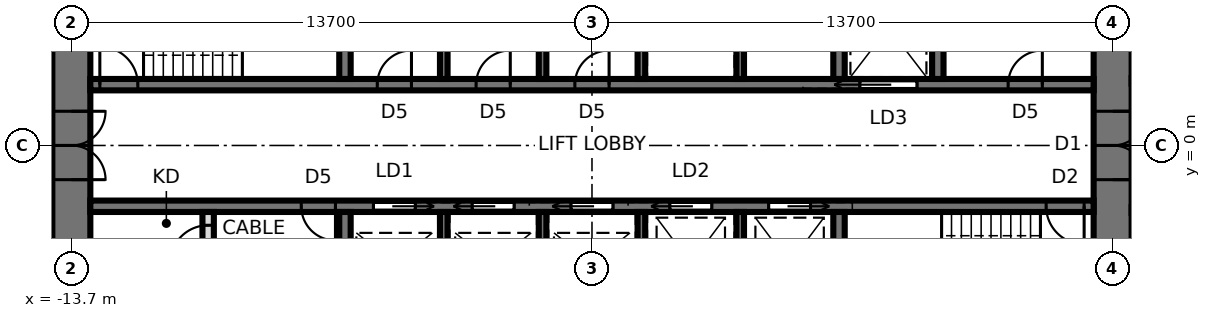
"""IFC4 building model, lengths in metres.
Left out: names, types, materials, properties, quantities, classifications, styles, units other than length and angle.
Written with IfcOpenShell. Run it as: python <this file> out.ifc"""

import sys

from ifc_helpers import new_model, si_unit, direction, frame, frame_2d, origin, place, context, subcontext, project, spatial, rectangle, extrude, element, fill, save


model = new_model("IFC4")
c1 = context("Model", 3, precision=1e-05, world=origin(), true_north=direction((0.0, 1.0)))
c2 = subcontext(c1, "Body", "Model", "MODEL_VIEW")
j1 = project(units=[si_unit("LENGTHUNIT", "METRE"), si_unit("PLANEANGLEUNIT", "RADIAN")], contexts=[c1])
p1 = place(None, origin())
s1 = spatial("IfcSite", under=j1, at=p1, CompositionType="ELEMENT")
p2 = place(p1, origin())
s2 = spatial("IfcBuilding", under=s1, at=p2, CompositionType="ELEMENT")
p3 = place(p2, frame((0.0, 0.0, 154.8)))
s3 = spatial("IfcBuildingStorey", under=s2, at=p3, CompositionType="ELEMENT", Elevation=154.8)
p4 = place(p3, frame((13.7, -9.5, 0.0), z_axis=(0.0, 0.0, 1.0), x_axis=(0.0, 1.0, 0.0)))
e1 = element("IfcWall", 1, at=p4, inside=s3, PredefinedType="SHEAR", context=c2, shape_type="SweptSolid", body=[
    extrude(rectangle(XDim=19.0, YDim=1.0, at=frame_2d((9.5, 0.0))), origin(), (0.0, 0.0, 1.0), 3.9),
])
p5 = place(p4, frame((8.6, 0.0, 0.0)))
e2 = element("IfcOpeningElement", 2, at=p5, cuts=e1, PredefinedType="OPENING", context=c2, shape_type="SweptSolid", body=[
    extrude(rectangle(XDim=1.8, YDim=2.4, at=frame_2d((0.9, 1.2))), frame((0.0, 0.51, 0.0), z_axis=(0.0, -1.0, 0.0), x_axis=(1.0, 0.0, 0.0)), (0.0, 0.0, 1.0), 1.02),
])
p6 = place(p3, frame((-13.7, 9.5, 0.0), z_axis=(0.0, 0.0, 1.0), x_axis=(0.0, -1.0, 0.0)))
e3 = element("IfcWall", 3, at=p6, inside=s3, PredefinedType="SHEAR", context=c2, shape_type="SweptSolid", body=[
    extrude(rectangle(XDim=19.0, YDim=1.0, at=frame_2d((9.5, 0.0))), origin(), (0.0, 0.0, 1.0), 3.9),
])
p7 = place(p6, frame((8.6, 0.0, 0.0)))
e4 = element("IfcOpeningElement", 4, at=p7, cuts=e3, PredefinedType="OPENING", context=c2, shape_type="SweptSolid", body=[
    extrude(rectangle(XDim=1.8, YDim=2.4, at=frame_2d((0.9, 1.2))), frame((0.0, 0.51, 0.0), z_axis=(0.0, -1.0, 0.0), x_axis=(1.0, 0.0, 0.0)), (0.0, 0.0, 1.0), 1.02),
])
p8 = place(p3, frame((-13.2, 1.6, 0.0), z_axis=(0.0, 0.0, 1.0), x_axis=(1.0, 0.0, 0.0)))
e5 = element("IfcWall", 5, at=p8, inside=s3, PredefinedType="SHEAR", context=c2, shape_type="SweptSolid", body=[
    extrude(rectangle(XDim=26.4, YDim=0.3, at=frame_2d((13.2, 0.0))), origin(), (0.0, 0.0, 1.0), 3.9),
])
p9 = place(p8, frame((0.25, 0.0, 0.0)))
e6 = element("IfcOpeningElement", 6, at=p9, cuts=e5, PredefinedType="OPENING", context=c2, shape_type="SweptSolid", body=[
    extrude(rectangle(XDim=1.0, YDim=2.1, at=frame_2d((0.5, 1.05))), frame((0.0, 0.16, 0.0), z_axis=(0.0, -1.0, 0.0), x_axis=(1.0, 0.0, 0.0)), (0.0, 0.0, 1.0), 0.32),
])
p10 = place(p8, frame((20.25, 0.0, 0.0)))
e7 = element("IfcOpeningElement", 7, at=p10, cuts=e5, PredefinedType="OPENING", context=c2, shape_type="SweptSolid", body=[
    extrude(rectangle(XDim=1.5, YDim=2.4, at=frame_2d((0.75, 1.2))), frame((0.0, 0.16, 0.0), z_axis=(0.0, -1.0, 0.0), x_axis=(1.0, 0.0, 0.0)), (0.0, 0.0, 1.0), 0.32),
])
p11 = place(p8, frame((7.55, 0.0, 0.0)))
e8 = element("IfcOpeningElement", 8, at=p11, cuts=e5, PredefinedType="OPENING", context=c2, shape_type="SweptSolid", body=[
    extrude(rectangle(XDim=0.9, YDim=2.1, at=frame_2d((0.45, 1.05))), frame((0.0, 0.16, 0.0), z_axis=(0.0, -1.0, 0.0), x_axis=(1.0, 0.0, 0.0)), (0.0, 0.0, 1.0), 0.32),
])
p12 = place(p8, frame((10.15, 0.0, 0.0)))
e9 = element("IfcOpeningElement", 9, at=p12, cuts=e5, PredefinedType="OPENING", context=c2, shape_type="SweptSolid", body=[
    extrude(rectangle(XDim=0.9, YDim=2.1, at=frame_2d((0.45, 1.05))), frame((0.0, 0.16, 0.0), z_axis=(0.0, -1.0, 0.0), x_axis=(1.0, 0.0, 0.0)), (0.0, 0.0, 1.0), 0.32),
])
p13 = place(p8, frame((12.75, 0.0, 0.0)))
e10 = element("IfcOpeningElement", 10, at=p13, cuts=e5, PredefinedType="OPENING", context=c2, shape_type="SweptSolid", body=[
    extrude(rectangle(XDim=0.9, YDim=2.1, at=frame_2d((0.45, 1.05))), frame((0.0, 0.16, 0.0), z_axis=(0.0, -1.0, 0.0), x_axis=(1.0, 0.0, 0.0)), (0.0, 0.0, 1.0), 0.32),
])
p14 = place(p8, frame((24.15, 0.0, 0.0)))
e11 = element("IfcOpeningElement", 11, at=p14, cuts=e5, PredefinedType="OPENING", context=c2, shape_type="SweptSolid", body=[
    extrude(rectangle(XDim=0.9, YDim=2.1, at=frame_2d((0.45, 1.05))), frame((0.0, 0.16, 0.0), z_axis=(0.0, -1.0, 0.0), x_axis=(1.0, 0.0, 0.0)), (0.0, 0.0, 1.0), 0.32),
])
p15 = place(p3, frame((-13.2, -1.6, 0.0), z_axis=(0.0, 0.0, 1.0), x_axis=(1.0, 0.0, 0.0)))
e12 = element("IfcWall", 12, at=p15, inside=s3, PredefinedType="SHEAR", context=c2, shape_type="SweptSolid", body=[
    extrude(rectangle(XDim=26.4, YDim=0.3, at=frame_2d((13.2, 0.0))), origin(), (0.0, 0.0, 1.0), 3.9),
])
p16 = place(p15, frame((25.15, 0.0, 0.0)))
e13 = element("IfcOpeningElement", 13, at=p16, cuts=e12, PredefinedType="OPENING", context=c2, shape_type="SweptSolid", body=[
    extrude(rectangle(XDim=1.0, YDim=2.1, at=frame_2d((0.5, 1.05))), frame((0.0, 0.16, 0.0), z_axis=(0.0, -1.0, 0.0), x_axis=(1.0, 0.0, 0.0)), (0.0, 0.0, 1.0), 0.32),
])
p17 = place(p15, frame((7.45, 0.0, 0.0)))
e14 = element("IfcOpeningElement", 14, at=p17, cuts=e12, PredefinedType="OPENING", context=c2, shape_type="SweptSolid", body=[
    extrude(rectangle(XDim=1.1, YDim=2.3, at=frame_2d((0.55, 1.15))), frame((0.0, 0.16, 0.0), z_axis=(0.0, -1.0, 0.0), x_axis=(1.0, 0.0, 0.0)), (0.0, 0.0, 1.0), 0.32),
])
p18 = place(p15, frame((10.05, 0.0, 0.0)))
e15 = element("IfcOpeningElement", 15, at=p18, cuts=e12, PredefinedType="OPENING", context=c2, shape_type="SweptSolid", body=[
    extrude(rectangle(XDim=1.1, YDim=2.3, at=frame_2d((0.55, 1.15))), frame((0.0, 0.16, 0.0), z_axis=(0.0, -1.0, 0.0), x_axis=(1.0, 0.0, 0.0)), (0.0, 0.0, 1.0), 0.32),
])
p19 = place(p15, frame((12.65, 0.0, 0.0)))
e16 = element("IfcOpeningElement", 16, at=p19, cuts=e12, PredefinedType="OPENING", context=c2, shape_type="SweptSolid", body=[
    extrude(rectangle(XDim=1.1, YDim=2.3, at=frame_2d((0.55, 1.15))), frame((0.0, 0.16, 0.0), z_axis=(0.0, -1.0, 0.0), x_axis=(1.0, 0.0, 0.0)), (0.0, 0.0, 1.0), 0.32),
])
p20 = place(p15, frame((15.25, 0.0, 0.0)))
e17 = element("IfcOpeningElement", 17, at=p20, cuts=e12, PredefinedType="OPENING", context=c2, shape_type="SweptSolid", body=[
    extrude(rectangle(XDim=1.1, YDim=2.3, at=frame_2d((0.55, 1.15))), frame((0.0, 0.16, 0.0), z_axis=(0.0, -1.0, 0.0), x_axis=(1.0, 0.0, 0.0)), (0.0, 0.0, 1.0), 0.32),
])
p21 = place(p15, frame((17.85, 0.0, 0.0)))
e18 = element("IfcOpeningElement", 18, at=p21, cuts=e12, PredefinedType="OPENING", context=c2, shape_type="SweptSolid", body=[
    extrude(rectangle(XDim=1.1, YDim=2.3, at=frame_2d((0.55, 1.15))), frame((0.0, 0.16, 0.0), z_axis=(0.0, -1.0, 0.0), x_axis=(1.0, 0.0, 0.0)), (0.0, 0.0, 1.0), 0.32),
])
p22 = place(p15, frame((5.55, 0.0, 0.0)))
e19 = element("IfcOpeningElement", 19, at=p22, cuts=e12, PredefinedType="OPENING", context=c2, shape_type="SweptSolid", body=[
    extrude(rectangle(XDim=0.9, YDim=2.1, at=frame_2d((0.45, 1.05))), frame((0.0, 0.16, 0.0), z_axis=(0.0, -1.0, 0.0), x_axis=(1.0, 0.0, 0.0)), (0.0, 0.0, 1.0), 0.32),
])
for number, where, z_axis, x_axis in (
    (20, (-6.5, 1.75, 0.0), (0.0, 0.0, 1.0), (0.0, 1.0, 0.0)),
    (21, (6.5, 1.75, 0.0), (0.0, 0.0, 1.0), (0.0, 1.0, 0.0)),
):
    element("IfcWall", number, at=place(p3, frame(where, z_axis=z_axis, x_axis=x_axis)), inside=s3, PredefinedType="SHEAR", context=c2, shape_type="SweptSolid", body=[
        extrude(rectangle(XDim=2.7, YDim=0.3, at=frame_2d((1.35, 0.0))), origin(), (0.0, 0.0, 1.0), 3.9),
    ])
for number, where, z_axis, x_axis in (
    (22, (-3.9, 1.75, 0.0), (0.0, 0.0, 1.0), (0.0, 1.0, 0.0)),
    (23, (-1.3, 1.75, 0.0), (0.0, 0.0, 1.0), (0.0, 1.0, 0.0)),
    (24, (1.3, 1.75, 0.0), (0.0, 0.0, 1.0), (0.0, 1.0, 0.0)),
    (25, (3.9, 1.75, 0.0), (0.0, 0.0, 1.0), (0.0, 1.0, 0.0)),
):
    element("IfcWall", number, at=place(p3, frame(where, z_axis=z_axis, x_axis=x_axis)), inside=s3, PredefinedType="SHEAR", context=c2, shape_type="SweptSolid", body=[
        extrude(rectangle(XDim=2.7, YDim=0.2, at=frame_2d((1.35, 0.0))), origin(), (0.0, 0.0, 1.0), 3.9),
    ])
for number, where, z_axis, x_axis in (
    (26, (-6.5, -1.75, 0.0), (0.0, 0.0, 1.0), (0.0, -1.0, 0.0)),
    (27, (6.5, -1.75, 0.0), (0.0, 0.0, 1.0), (0.0, -1.0, 0.0)),
):
    element("IfcWall", number, at=place(p3, frame(where, z_axis=z_axis, x_axis=x_axis)), inside=s3, PredefinedType="SHEAR", context=c2, shape_type="SweptSolid", body=[
        extrude(rectangle(XDim=2.7, YDim=0.3, at=frame_2d((1.35, 0.0))), origin(), (0.0, 0.0, 1.0), 3.9),
    ])
for number, where, z_axis, x_axis in (
    (28, (-3.9, -1.75, 0.0), (0.0, 0.0, 1.0), (0.0, -1.0, 0.0)),
    (29, (-1.3, -1.75, 0.0), (0.0, 0.0, 1.0), (0.0, -1.0, 0.0)),
    (30, (1.3, -1.75, 0.0), (0.0, 0.0, 1.0), (0.0, -1.0, 0.0)),
    (31, (3.9, -1.75, 0.0), (0.0, 0.0, 1.0), (0.0, -1.0, 0.0)),
):
    element("IfcWall", number, at=place(p3, frame(where, z_axis=z_axis, x_axis=x_axis)), inside=s3, PredefinedType="SHEAR", context=c2, shape_type="SweptSolid", body=[
        extrude(rectangle(XDim=2.7, YDim=0.2, at=frame_2d((1.35, 0.0))), origin(), (0.0, 0.0, 1.0), 3.9),
    ])
p23 = place(p3, frame((9.1, 1.75, 0.0), z_axis=(0.0, 0.0, 1.0), x_axis=(0.0, 1.0, 0.0)))
e32 = element("IfcWall", 32, at=p23, inside=s3, PredefinedType="SHEAR", context=c2, shape_type="SweptSolid", body=[
    extrude(rectangle(XDim=2.7, YDim=0.3, at=frame_2d((1.35, 0.0))), origin(), (0.0, 0.0, 1.0), 3.9),
])
p24 = place(p3, frame((-10.1, -3.25, 0.0), z_axis=(0.0, 0.0, 1.0), x_axis=(0.0, 1.0, 0.0)))
e33 = element("IfcWall", 33, at=p24, inside=s3, PredefinedType="PARTITIONING", context=c2, shape_type="SweptSolid", body=[
    extrude(rectangle(XDim=1.5, YDim=0.3, at=frame_2d((0.75, 0.0))), origin(), (0.0, 0.0, 1.0), 3.74),
])
p25 = place(p24, frame((0.15, 0.0, 0.0)))
e34 = element("IfcOpeningElement", 34, at=p25, cuts=e33, PredefinedType="OPENING", context=c2, shape_type="SweptSolid", body=[
    extrude(rectangle(XDim=1.0, YDim=2.4, at=frame_2d((0.5, 1.2))), frame((0.0, 0.16, 0.0), z_axis=(0.0, -1.0, 0.0), x_axis=(1.0, 0.0, 0.0)), (0.0, 0.0, 1.0), 0.32),
])
p26 = place(p7, origin())
e35 = element("IfcDoor", 35, at=p26, inside=s3, OperationType="DOUBLE_DOOR_SINGLE_SWING", PredefinedType="DOOR", context=c2, shape_type="SweptSolid", body=[
    extrude(rectangle(XDim=1.72, YDim=2.36, at=frame_2d((0.9, 1.18))), frame((0.0, 0.025, 0.0), z_axis=(0.0, -1.0, 0.0), x_axis=(1.0, 0.0, 0.0)), (0.0, 0.0, 1.0), 0.05),
    extrude(rectangle(XDim=0.04, YDim=2.4, at=frame_2d((0.02, 1.2))), frame((0.0, 0.25, 0.0), z_axis=(0.0, -1.0, 0.0), x_axis=(1.0, 0.0, 0.0)), (0.0, 0.0, 1.0), 0.5),
    extrude(rectangle(XDim=0.04, YDim=2.4, at=frame_2d((1.78, 1.2))), frame((0.0, 0.25, 0.0), z_axis=(0.0, -1.0, 0.0), x_axis=(1.0, 0.0, 0.0)), (0.0, 0.0, 1.0), 0.5),
    extrude(rectangle(XDim=1.72, YDim=0.04, at=frame_2d((0.9, 2.38))), frame((0.0, 0.25, 0.0), z_axis=(0.0, -1.0, 0.0), x_axis=(1.0, 0.0, 0.0)), (0.0, 0.0, 1.0), 0.5),
])
fill(e4, e35)
p27 = place(p5, frame((1.8, 0.0, 0.0), z_axis=(0.0, 0.0, 1.0), x_axis=(-1.0, 0.0, 0.0)))
e36 = element("IfcDoor", 36, at=p27, inside=s3, OperationType="DOUBLE_DOOR_SINGLE_SWING", PredefinedType="DOOR", context=c2, shape_type="SweptSolid", body=[
    extrude(rectangle(XDim=1.72, YDim=2.36, at=frame_2d((0.9, 1.18))), frame((0.0, 0.025, 0.0), z_axis=(0.0, -1.0, 0.0), x_axis=(1.0, 0.0, 0.0)), (0.0, 0.0, 1.0), 0.05),
    extrude(rectangle(XDim=0.04, YDim=2.4, at=frame_2d((1.78, 1.2))), frame((0.0, 0.25, 0.0), z_axis=(0.0, -1.0, 0.0), x_axis=(1.0, 0.0, 0.0)), (0.0, 0.0, 1.0), 0.5),
    extrude(rectangle(XDim=0.04, YDim=2.4, at=frame_2d((0.02, 1.2))), frame((0.0, 0.25, 0.0), z_axis=(0.0, -1.0, 0.0), x_axis=(1.0, 0.0, 0.0)), (0.0, 0.0, 1.0), 0.5),
    extrude(rectangle(XDim=1.72, YDim=0.04, at=frame_2d((0.9, 2.38))), frame((0.0, 0.25, 0.0), z_axis=(0.0, -1.0, 0.0), x_axis=(1.0, 0.0, 0.0)), (0.0, 0.0, 1.0), 0.5),
])
fill(e2, e36)
p28 = place(p9, origin())
e37 = element("IfcDoor", 37, at=p28, inside=s3, OperationType="SINGLE_SWING_LEFT", PredefinedType="DOOR", context=c2, shape_type="SweptSolid", body=[
    extrude(rectangle(XDim=1.0, YDim=2.1, at=frame_2d((0.5, 1.05))), frame((0.0, 0.025, 0.0), z_axis=(0.0, -1.0, 0.0), x_axis=(1.0, 0.0, 0.0)), (0.0, 0.0, 1.0), 0.05),
])
fill(e6, e37)
p29 = place(p16, frame((1.0, 0.0, 0.0), z_axis=(0.0, 0.0, 1.0), x_axis=(-1.0, 0.0, 0.0)))
e38 = element("IfcDoor", 38, at=p29, inside=s3, OperationType="SINGLE_SWING_LEFT", PredefinedType="DOOR", context=c2, shape_type="SweptSolid", body=[
    extrude(rectangle(XDim=1.0, YDim=2.1, at=frame_2d((0.5, 1.05))), frame((0.0, 0.025, 0.0), z_axis=(0.0, -1.0, 0.0), x_axis=(1.0, 0.0, 0.0)), (0.0, 0.0, 1.0), 0.05),
])
fill(e13, e38)
p30 = place(p10, origin())
e39 = element("IfcDoor", 39, at=p30, inside=s3, OperationType="SLIDING_TO_LEFT", PredefinedType="DOOR", context=c2, shape_type="SweptSolid", body=[
    extrude(rectangle(XDim=1.5, YDim=2.4, at=frame_2d((0.75, 1.2))), frame((0.0, 0.025, 0.0), z_axis=(0.0, -1.0, 0.0), x_axis=(1.0, 0.0, 0.0)), (0.0, 0.0, 1.0), 0.05),
])
fill(e7, e39)
p31 = place(p11, origin())
e40 = element("IfcDoor", 40, at=p31, inside=s3, OperationType="SINGLE_SWING_RIGHT", PredefinedType="DOOR", context=c2, shape_type="SweptSolid", body=[
    extrude(rectangle(XDim=0.9, YDim=2.1, at=frame_2d((0.45, 1.05))), frame((0.0, 0.025, 0.0), z_axis=(0.0, -1.0, 0.0), x_axis=(1.0, 0.0, 0.0)), (0.0, 0.0, 1.0), 0.05),
])
fill(e8, e40)
p32 = place(p12, origin())
e41 = element("IfcDoor", 41, at=p32, inside=s3, OperationType="SINGLE_SWING_RIGHT", PredefinedType="DOOR", context=c2, shape_type="SweptSolid", body=[
    extrude(rectangle(XDim=0.9, YDim=2.1, at=frame_2d((0.45, 1.05))), frame((0.0, 0.025, 0.0), z_axis=(0.0, -1.0, 0.0), x_axis=(1.0, 0.0, 0.0)), (0.0, 0.0, 1.0), 0.05),
])
fill(e9, e41)
p33 = place(p13, origin())
e42 = element("IfcDoor", 42, at=p33, inside=s3, OperationType="SINGLE_SWING_RIGHT", PredefinedType="DOOR", context=c2, shape_type="SweptSolid", body=[
    extrude(rectangle(XDim=0.9, YDim=2.1, at=frame_2d((0.45, 1.05))), frame((0.0, 0.025, 0.0), z_axis=(0.0, -1.0, 0.0), x_axis=(1.0, 0.0, 0.0)), (0.0, 0.0, 1.0), 0.05),
])
fill(e10, e42)
p34 = place(p17, frame((1.1, 0.0, 0.0), z_axis=(0.0, 0.0, 1.0), x_axis=(-1.0, 0.0, 0.0)))
e43 = element("IfcDoor", 43, at=p34, inside=s3, OperationType="SLIDING_TO_LEFT", PredefinedType="DOOR", context=c2, shape_type="SweptSolid", body=[
    extrude(rectangle(XDim=1.1, YDim=2.3, at=frame_2d((0.55, 1.15))), frame((0.0, 0.025, 0.0), z_axis=(0.0, -1.0, 0.0), x_axis=(1.0, 0.0, 0.0)), (0.0, 0.0, 1.0), 0.05),
])
fill(e14, e43)
p35 = place(p18, frame((1.1, 0.0, 0.0), z_axis=(0.0, 0.0, 1.0), x_axis=(-1.0, 0.0, 0.0)))
e44 = element("IfcDoor", 44, at=p35, inside=s3, OperationType="SLIDING_TO_RIGHT", PredefinedType="DOOR", context=c2, shape_type="SweptSolid", body=[
    extrude(rectangle(XDim=1.1, YDim=2.3, at=frame_2d((0.55, 1.15))), frame((0.0, 0.025, 0.0), z_axis=(0.0, -1.0, 0.0), x_axis=(1.0, 0.0, 0.0)), (0.0, 0.0, 1.0), 0.05),
])
fill(e15, e44)
p36 = place(p19, frame((1.1, 0.0, 0.0), z_axis=(0.0, 0.0, 1.0), x_axis=(-1.0, 0.0, 0.0)))
e45 = element("IfcDoor", 45, at=p36, inside=s3, OperationType="SLIDING_TO_RIGHT", PredefinedType="DOOR", context=c2, shape_type="SweptSolid", body=[
    extrude(rectangle(XDim=1.1, YDim=2.3, at=frame_2d((0.55, 1.15))), frame((0.0, 0.025, 0.0), z_axis=(0.0, -1.0, 0.0), x_axis=(1.0, 0.0, 0.0)), (0.0, 0.0, 1.0), 0.05),
])
fill(e16, e45)
p37 = place(p20, frame((1.1, 0.0, 0.0), z_axis=(0.0, 0.0, 1.0), x_axis=(-1.0, 0.0, 0.0)))
e46 = element("IfcDoor", 46, at=p37, inside=s3, OperationType="SLIDING_TO_RIGHT", PredefinedType="DOOR", context=c2, shape_type="SweptSolid", body=[
    extrude(rectangle(XDim=1.1, YDim=2.3, at=frame_2d((0.55, 1.15))), frame((0.0, 0.025, 0.0), z_axis=(0.0, -1.0, 0.0), x_axis=(1.0, 0.0, 0.0)), (0.0, 0.0, 1.0), 0.05),
])
fill(e17, e46)
p38 = place(p21, frame((1.1, 0.0, 0.0), z_axis=(0.0, 0.0, 1.0), x_axis=(-1.0, 0.0, 0.0)))
e47 = element("IfcDoor", 47, at=p38, inside=s3, OperationType="SLIDING_TO_LEFT", PredefinedType="DOOR", context=c2, shape_type="SweptSolid", body=[
    extrude(rectangle(XDim=1.1, YDim=2.3, at=frame_2d((0.55, 1.15))), frame((0.0, 0.025, 0.0), z_axis=(0.0, -1.0, 0.0), x_axis=(1.0, 0.0, 0.0)), (0.0, 0.0, 1.0), 0.05),
])
fill(e18, e47)
p39 = place(p14, origin())
e48 = element("IfcDoor", 48, at=p39, inside=s3, OperationType="SINGLE_SWING_RIGHT", PredefinedType="DOOR", context=c2, shape_type="SweptSolid", body=[
    extrude(rectangle(XDim=0.9, YDim=2.1, at=frame_2d((0.45, 1.05))), frame((0.0, 0.025, 0.0), z_axis=(0.0, -1.0, 0.0), x_axis=(1.0, 0.0, 0.0)), (0.0, 0.0, 1.0), 0.05),
])
fill(e11, e48)
p40 = place(p22, frame((0.9, 0.0, 0.0), z_axis=(0.0, 0.0, 1.0), x_axis=(-1.0, 0.0, 0.0)))
e49 = element("IfcDoor", 49, at=p40, inside=s3, OperationType="SINGLE_SWING_LEFT", PredefinedType="DOOR", context=c2, shape_type="SweptSolid", body=[
    extrude(rectangle(XDim=0.9, YDim=2.1, at=frame_2d((0.45, 1.05))), frame((0.0, 0.025, 0.0), z_axis=(0.0, -1.0, 0.0), x_axis=(1.0, 0.0, 0.0)), (0.0, 0.0, 1.0), 0.05),
])
fill(e19, e49)
p41 = place(p25, origin())
e50 = element("IfcDoor", 50, at=p41, inside=s3, OperationType="SINGLE_SWING_LEFT", PredefinedType="DOOR", context=c2, shape_type="SweptSolid", body=[
    extrude(rectangle(XDim=1.0, YDim=2.4, at=frame_2d((0.5, 1.2))), frame((0.0, 0.025, 0.0), z_axis=(0.0, -1.0, 0.0), x_axis=(1.0, 0.0, 0.0)), (0.0, 0.0, 1.0), 0.05),
])
fill(e34, e50)
save(model, sys.argv[1])
